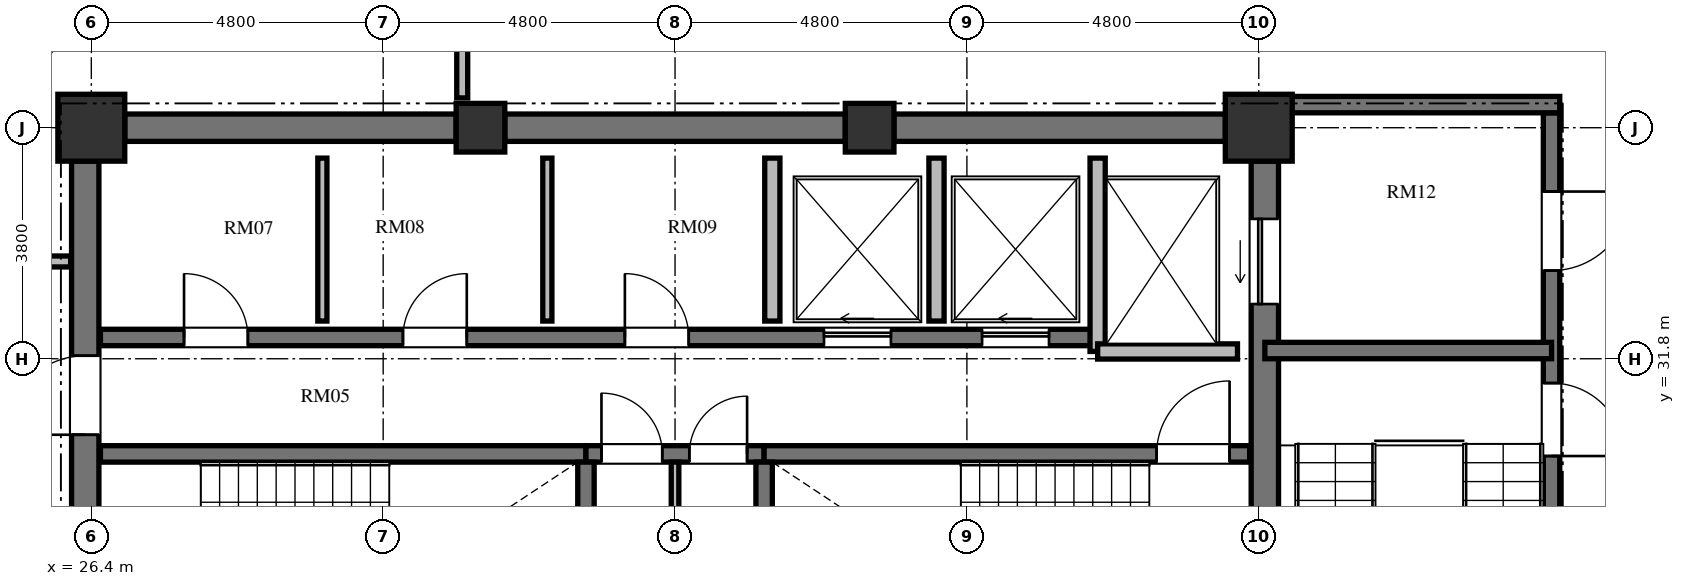
"""IFC4 building model, lengths in metres.
Left out: names, types, materials, properties, quantities, classifications, styles, units other than length and angle.
Written with IfcOpenShell. Run it as: python <this file> out.ifc"""

import sys

from ifc_helpers import new_model, si_unit, direction, frame, frame_2d, origin, origin_2d, place, context, subcontext, project, spatial, rectangle, extrude, element, fill, save


model = new_model("IFC4")
c1 = context("Model", 3, precision=1e-05, world=origin(), true_north=direction((0.0, 1.0)))
c2 = subcontext(c1, "Body", "Model", "MODEL_VIEW")
j1 = project(units=[si_unit("LENGTHUNIT", "METRE"), si_unit("PLANEANGLEUNIT", "RADIAN")], contexts=[c1])
p1 = place(None, origin())
s1 = spatial("IfcSite", under=j1, at=p1, CompositionType="ELEMENT")
p2 = place(p1, origin())
s2 = spatial("IfcBuilding", under=s1, at=p2, CompositionType="ELEMENT")
p3 = place(p2, frame((0.0, 0.0, 280.56)))
s3 = spatial("IfcBuildingStorey", under=s2, at=p3, CompositionType="ELEMENT", Elevation=280.56)
p4 = place(p3, frame((45.6, 35.6, 0.0), z_axis=(0.0, 0.0, 1.0), x_axis=(1.0, 0.0, 0.0)))
e1 = element("IfcColumn", 1, at=p4, inside=s3, PredefinedType="COLUMN", context=c2, shape_type="SweptSolid", body=[
    extrude(rectangle(XDim=1.1, YDim=1.1, at=origin_2d()), origin(), (0.0, 0.0, 1.0), 3.648),
])
for number, where, z_axis, x_axis in (
    (2, (39.2, 35.6, 0.0), (0.0, 0.0, 1.0), (1.0, 0.0, 0.0)),
    (3, (32.8, 35.6, 0.0), (0.0, 0.0, 1.0), (1.0, 0.0, 0.0)),
):
    element("IfcColumn", number, at=place(p3, frame(where, z_axis=z_axis, x_axis=x_axis)), inside=s3, PredefinedType="COLUMN", context=c2, shape_type="SweptSolid", body=[
        extrude(rectangle(XDim=0.8, YDim=0.8, at=origin_2d()), origin(), (0.0, 0.0, 1.0), 3.648),
    ])
p5 = place(p3, frame((26.4, 35.6, 0.0), z_axis=(0.0, 0.0, 1.0), x_axis=(1.0, 0.0, 0.0)))
e4 = element("IfcColumn", 4, at=p5, inside=s3, PredefinedType="COLUMN", context=c2, shape_type="SweptSolid", body=[
    extrude(rectangle(XDim=1.1, YDim=1.1, at=origin_2d()), origin(), (0.0, 0.0, 1.0), 3.648),
])
p6 = place(p3, frame((26.3, 20.95, 0.0), z_axis=(0.0, 0.0, 1.0), x_axis=(0.0, 1.0, 0.0)))
e5 = element("IfcWall", 5, at=p6, inside=s3, PredefinedType="SHEAR", context=c2, shape_type="SweptSolid", body=[
    extrude(rectangle(XDim=14.1, YDim=0.45, at=frame_2d((7.05, 0.0))), origin(), (0.0, 0.0, 1.0), 3.648),
])
p7 = place(p6, frame((6.5, 0.0, 0.0)))
e6 = element("IfcOpeningElement", 6, at=p7, cuts=e5, PredefinedType="OPENING", context=c2, shape_type="SweptSolid", body=[
    extrude(rectangle(XDim=1.2, YDim=2.15, at=frame_2d((0.6, 1.075))), frame((0.0, 0.235, 0.0), z_axis=(0.0, -1.0, 0.0), x_axis=(1.0, 0.0, 0.0)), (0.0, 0.0, 1.0), 0.47),
])
p8 = place(p6, frame((9.6, 0.0, 0.0)))
e7 = element("IfcOpeningElement", 7, at=p8, cuts=e5, PredefinedType="OPENING", context=c2, shape_type="SweptSolid", body=[
    extrude(rectangle(XDim=1.3, YDim=2.2, at=frame_2d((0.65, 1.1))), frame((0.0, 0.235, 0.0), z_axis=(0.0, -1.0, 0.0), x_axis=(1.0, 0.0, 0.0)), (0.0, 0.0, 1.0), 0.47),
])
p9 = place(p6, frame((3.26, 0.0, 0.0)))
e8 = element("IfcOpeningElement", 8, at=p9, cuts=e5, PredefinedType="OPENING", context=c2, shape_type="SweptSolid", body=[
    extrude(rectangle(XDim=1.3, YDim=2.2, at=frame_2d((0.65, 1.1))), frame((0.0, 0.235, 0.0), z_axis=(0.0, -1.0, 0.0), x_axis=(1.0, 0.0, 0.0)), (0.0, 0.0, 1.0), 0.47),
])
p10 = place(p3, frame((45.7, 20.95, 0.0), z_axis=(0.0, 0.0, 1.0), x_axis=(0.0, 1.0, 0.0)))
e9 = element("IfcWall", 9, at=p10, inside=s3, PredefinedType="SHEAR", context=c2, shape_type="SweptSolid", body=[
    extrude(rectangle(XDim=14.1, YDim=0.45, at=frame_2d((7.05, 0.0))), origin(), (0.0, 0.0, 1.0), 3.648),
])
p11 = place(p10, frame((11.75, 0.0, 0.0)))
e10 = element("IfcOpeningElement", 10, at=p11, cuts=e9, PredefinedType="OPENING", context=c2, shape_type="SweptSolid", body=[
    extrude(rectangle(XDim=1.4, YDim=2.3, at=frame_2d((0.7, 1.15))), frame((0.0, 0.235, 0.0), z_axis=(0.0, -1.0, 0.0), x_axis=(1.0, 0.0, 0.0)), (0.0, 0.0, 1.0), 0.47),
])
p12 = place(p10, frame((0.95, 0.0, 0.0)))
e11 = element("IfcOpeningElement", 11, at=p12, cuts=e9, PredefinedType="OPENING", context=c2, shape_type="SweptSolid", body=[
    extrude(rectangle(XDim=1.4, YDim=2.3, at=frame_2d((0.7, 1.15))), frame((0.0, 0.235, 0.0), z_axis=(0.0, -1.0, 0.0), x_axis=(1.0, 0.0, 0.0)), (0.0, 0.0, 1.0), 0.47),
])
p13 = place(p3, frame((26.95, 35.6, 0.0), z_axis=(0.0, 0.0, 1.0), x_axis=(1.0, 0.0, 0.0)))
e12 = element("IfcWall", 12, at=p13, inside=s3, PredefinedType="SHEAR", context=c2, shape_type="SweptSolid", body=[
    extrude(rectangle(XDim=5.45, YDim=0.45, at=frame_2d((2.725, 0.0))), origin(), (0.0, 0.0, 1.0), 3.648),
])
p14 = place(p3, frame((33.2, 35.6, 0.0), z_axis=(0.0, 0.0, 1.0), x_axis=(1.0, 0.0, 0.0)))
e13 = element("IfcWall", 13, at=p14, inside=s3, PredefinedType="SHEAR", context=c2, shape_type="SweptSolid", body=[
    extrude(rectangle(XDim=5.6, YDim=0.45, at=frame_2d((2.8, 0.0))), origin(), (0.0, 0.0, 1.0), 3.648),
])
p15 = place(p3, frame((39.6, 35.6, 0.0), z_axis=(0.0, 0.0, 1.0), x_axis=(1.0, 0.0, 0.0)))
e14 = element("IfcWall", 14, at=p15, inside=s3, PredefinedType="SHEAR", context=c2, shape_type="SweptSolid", body=[
    extrude(rectangle(XDim=5.45, YDim=0.45, at=frame_2d((2.725, 0.0))), origin(), (0.0, 0.0, 1.0), 3.648),
])
p16 = place(p3, frame((27.595, 38.808, 0.0), z_axis=(0.0, 0.0, 1.0), x_axis=(-0.728251519923, -0.685309947199, 0.0)))
e15 = element("IfcWall", 15, at=p16, inside=s3, PredefinedType="SOLIDWALL", context=c2, shape_type="SweptSolid", body=[
    extrude(rectangle(XDim=5.981, YDim=0.28, at=frame_2d((2.99, 0.0))), origin(), (0.0, 0.0, 1.0), 3.448),
])
p17 = place(p16, frame((2.391, 0.0, 0.85)))
e16 = element("IfcOpeningElement", 16, at=p17, cuts=e15, PredefinedType="OPENING", context=c2, shape_type="SweptSolid", body=[
    extrude(rectangle(XDim=1.2, YDim=1.8, at=frame_2d((0.6, 0.9))), frame((0.0, 0.15, 0.0), z_axis=(0.0, -1.0, 0.0), x_axis=(1.0, 0.0, 0.0)), (0.0, 0.0, 1.0), 0.3),
])
p18 = place(p3, frame((26.55, 30.235, 0.0), z_axis=(0.0, 0.0, 1.0), x_axis=(1.0, 0.0, 0.0)))
e17 = element("IfcWall", 17, at=p18, inside=s3, PredefinedType="SHEAR", context=c2, shape_type="SweptSolid", body=[
    extrude(rectangle(XDim=7.985, YDim=0.27, at=frame_2d((3.992, 0.0))), origin(), (0.0, 0.0, 1.0), 3.648),
])
p19 = place(p3, frame((34.535, 30.235, 0.0), z_axis=(0.0, 0.0, 1.0), x_axis=(1.0, 0.0, 0.0)))
e18 = element("IfcWall", 18, at=p19, inside=s3, PredefinedType="SHEAR", context=c2, shape_type="SweptSolid", body=[
    extrude(rectangle(XDim=2.93, YDim=0.27, at=frame_2d((1.465, 0.0))), origin(), (0.0, 0.0, 1.0), 3.648),
])
p20 = place(p19, frame((0.255, 0.0, 0.0)))
e19 = element("IfcOpeningElement", 19, at=p20, cuts=e18, PredefinedType="OPENING", context=c2, shape_type="SweptSolid", body=[
    extrude(rectangle(XDim=1.0, YDim=2.1, at=frame_2d((0.5, 1.05))), frame((0.0, 0.145, 0.0), z_axis=(0.0, -1.0, 0.0), x_axis=(1.0, 0.0, 0.0)), (0.0, 0.0, 1.0), 0.29),
])
p21 = place(p19, frame((1.7, 0.0, 0.0)))
e20 = element("IfcOpeningElement", 20, at=p21, cuts=e18, PredefinedType="OPENING", context=c2, shape_type="SweptSolid", body=[
    extrude(rectangle(XDim=0.95, YDim=2.1, at=frame_2d((0.475, 1.05))), frame((0.0, 0.145, 0.0), z_axis=(0.0, -1.0, 0.0), x_axis=(1.0, 0.0, 0.0)), (0.0, 0.0, 1.0), 0.29),
])
p22 = place(p3, frame((37.465, 30.235, 0.0), z_axis=(0.0, 0.0, 1.0), x_axis=(1.0, 0.0, 0.0)))
e21 = element("IfcWall", 21, at=p22, inside=s3, PredefinedType="SHEAR", context=c2, shape_type="SweptSolid", body=[
    extrude(rectangle(XDim=7.985, YDim=0.27, at=frame_2d((3.992, 0.0))), origin(), (0.0, 0.0, 1.0), 3.648),
])
p23 = place(p22, frame((6.455, 0.0, 0.0)))
e22 = element("IfcOpeningElement", 22, at=p23, cuts=e21, PredefinedType="OPENING", context=c2, shape_type="SweptSolid", body=[
    extrude(rectangle(XDim=1.2, YDim=2.15, at=frame_2d((0.6, 1.075))), frame((0.0, 0.145, 0.0), z_axis=(0.0, -1.0, 0.0), x_axis=(1.0, 0.0, 0.0)), (0.0, 0.0, 1.0), 0.29),
])
for number, where, z_axis, x_axis in (
    (23, (34.535, 26.02, 0.0), (0.0, 0.0, 1.0), (0.0, 1.0, 0.0)),
    (24, (37.465, 26.02, 0.0), (0.0, 0.0, 1.0), (0.0, 1.0, 0.0)),
):
    element("IfcWall", number, at=place(p3, frame(where, z_axis=z_axis, x_axis=x_axis)), inside=s3, PredefinedType="SHEAR", context=c2, shape_type="SweptSolid", body=[
        extrude(rectangle(XDim=4.08, YDim=0.27, at=frame_2d((2.04, 0.0))), origin(), (0.0, 0.0, 1.0), 3.648),
    ])
p24 = place(p3, frame((36.0, 26.02, 0.0), z_axis=(0.0, 0.0, 1.0), x_axis=(0.0, 1.0, 0.0)))
e25 = element("IfcWall", 25, at=p24, inside=s3, PredefinedType="PARTITIONING", context=c2, shape_type="SweptSolid", body=[
    extrude(rectangle(XDim=4.08, YDim=0.125, at=frame_2d((2.04, 0.0))), origin(), (0.0, 0.0, 1.0), 3.448),
])
p25 = place(p3, frame((26.55, 32.15, 0.0), z_axis=(0.0, 0.0, 1.0), x_axis=(1.0, 0.0, 0.0)))
e26 = element("IfcWall", 26, at=p25, inside=s3, PredefinedType="SHEAR", context=c2, shape_type="SweptSolid", body=[
    extrude(rectangle(XDim=16.4, YDim=0.27, at=frame_2d((8.2, 0.0))), origin(), (0.0, 0.0, 1.0), 3.648),
])
p26 = place(p25, frame((1.375, 0.0, 0.0)))
e27 = element("IfcOpeningElement", 27, at=p26, cuts=e26, PredefinedType="OPENING", context=c2, shape_type="SweptSolid", body=[
    extrude(rectangle(XDim=1.05, YDim=2.15, at=frame_2d((0.525, 1.075))), frame((0.0, 0.145, 0.0), z_axis=(0.0, -1.0, 0.0), x_axis=(1.0, 0.0, 0.0)), (0.0, 0.0, 1.0), 0.29),
])
p27 = place(p25, frame((4.975, 0.0, 0.0)))
e28 = element("IfcOpeningElement", 28, at=p27, cuts=e26, PredefinedType="OPENING", context=c2, shape_type="SweptSolid", body=[
    extrude(rectangle(XDim=1.05, YDim=2.15, at=frame_2d((0.525, 1.075))), frame((0.0, 0.145, 0.0), z_axis=(0.0, -1.0, 0.0), x_axis=(1.0, 0.0, 0.0)), (0.0, 0.0, 1.0), 0.29),
])
p28 = place(p25, frame((8.625, 0.0, 0.0)))
e29 = element("IfcOpeningElement", 29, at=p28, cuts=e26, PredefinedType="OPENING", context=c2, shape_type="SweptSolid", body=[
    extrude(rectangle(XDim=1.05, YDim=2.15, at=frame_2d((0.525, 1.075))), frame((0.0, 0.145, 0.0), z_axis=(0.0, -1.0, 0.0), x_axis=(1.0, 0.0, 0.0)), (0.0, 0.0, 1.0), 0.29),
])
p29 = place(p25, frame((11.9, 0.0, 0.0)))
e30 = element("IfcOpeningElement", 30, at=p29, cuts=e26, PredefinedType="OPENING", context=c2, shape_type="SweptSolid", body=[
    extrude(rectangle(XDim=1.1, YDim=2.2, at=frame_2d((0.55, 1.1))), frame((0.0, 0.145, 0.0), z_axis=(0.0, -1.0, 0.0), x_axis=(1.0, 0.0, 0.0)), (0.0, 0.0, 1.0), 0.29),
])
p30 = place(p25, frame((14.5, 0.0, 0.0)))
e31 = element("IfcOpeningElement", 31, at=p30, cuts=e26, PredefinedType="OPENING", context=c2, shape_type="SweptSolid", body=[
    extrude(rectangle(XDim=1.1, YDim=2.2, at=frame_2d((0.55, 1.1))), frame((0.0, 0.145, 0.0), z_axis=(0.0, -1.0, 0.0), x_axis=(1.0, 0.0, 0.0)), (0.0, 0.0, 1.0), 0.29),
])
p31 = place(p3, frame((42.95, 31.92, 0.0), z_axis=(0.0, 0.0, 1.0), x_axis=(0.0, 1.0, 0.0)))
e32 = element("IfcWall", 32, at=p31, inside=s3, PredefinedType="SOLIDWALL", context=c2, shape_type="SweptSolid", body=[
    extrude(rectangle(XDim=3.18, YDim=0.25, at=frame_2d((1.59, 0.0))), origin(), (0.0, 0.0, 1.0), 3.448),
])
p32 = place(p3, frame((42.95, 31.92, 0.0), z_axis=(0.0, 0.0, 1.0), x_axis=(1.0, 0.0, 0.0)))
e33 = element("IfcWall", 33, at=p32, inside=s3, PredefinedType="SOLIDWALL", context=c2, shape_type="SweptSolid", body=[
    extrude(rectangle(XDim=2.3, YDim=0.25, at=frame_2d((1.15, 0.0))), origin(), (0.0, 0.0, 1.0), 3.448),
])
for number, where, z_axis, x_axis in (
    (34, (37.6, 32.42, 0.0), (0.0, 0.0, 1.0), (0.0, 1.0, 0.0)),
    (35, (40.3, 32.42, 0.0), (0.0, 0.0, 1.0), (0.0, 1.0, 0.0)),
):
    element("IfcWall", number, at=place(p3, frame(where, z_axis=z_axis, x_axis=x_axis)), inside=s3, PredefinedType="SOLIDWALL", context=c2, shape_type="SweptSolid", body=[
        extrude(rectangle(XDim=2.68, YDim=0.25, at=frame_2d((1.34, 0.0))), origin(), (0.0, 0.0, 1.0), 3.448),
    ])
for number, where, z_axis, x_axis in (
    (36, (30.2, 32.42, 0.0), (0.0, 0.0, 1.0), (0.0, 1.0, 0.0)),
    (37, (33.9, 32.42, 0.0), (0.0, 0.0, 1.0), (0.0, 1.0, 0.0)),
):
    element("IfcWall", number, at=place(p3, frame(where, z_axis=z_axis, x_axis=x_axis)), inside=s3, PredefinedType="PARTITIONING", context=c2, shape_type="SweptSolid", body=[
        extrude(rectangle(XDim=2.68, YDim=0.15, at=frame_2d((1.34, 0.0))), origin(), (0.0, 0.0, 1.0), 3.448),
    ])
p33 = place(p3, frame((50.415, 35.845, 0.0), z_axis=(0.0, 0.0, 1.0), x_axis=(0.0, -1.0, 0.0)))
e38 = element("IfcWall", 38, at=p33, inside=s3, PredefinedType="SHEAR", context=c2, shape_type="SweptSolid", body=[
    extrude(rectangle(XDim=15.825, YDim=0.27, at=frame_2d((7.913, 0.0))), origin(), (0.0, 0.0, 1.0), 3.648),
])
p34 = place(p33, frame((4.445, 0.0, 0.0)))
e39 = element("IfcOpeningElement", 39, at=p34, cuts=e38, PredefinedType="OPENING", context=c2, shape_type="SweptSolid", body=[
    extrude(rectangle(XDim=1.2, YDim=2.15, at=frame_2d((0.6, 1.075))), frame((0.0, 0.145, 0.0), z_axis=(0.0, -1.0, 0.0), x_axis=(1.0, 0.0, 0.0)), (0.0, 0.0, 1.0), 0.29),
])
p35 = place(p33, frame((1.295, 0.0, 0.0)))
e40 = element("IfcOpeningElement", 40, at=p35, cuts=e38, PredefinedType="OPENING", context=c2, shape_type="SweptSolid", body=[
    extrude(rectangle(XDim=1.3, YDim=2.2, at=frame_2d((0.65, 1.1))), frame((0.0, 0.145, 0.0), z_axis=(0.0, -1.0, 0.0), x_axis=(1.0, 0.0, 0.0)), (0.0, 0.0, 1.0), 0.29),
])
p36 = place(p33, frame((13.095, 0.0, 0.0)))
e41 = element("IfcOpeningElement", 41, at=p36, cuts=e38, PredefinedType="OPENING", context=c2, shape_type="SweptSolid", body=[
    extrude(rectangle(XDim=1.3, YDim=2.2, at=frame_2d((0.65, 1.1))), frame((0.0, 0.145, 0.0), z_axis=(0.0, -1.0, 0.0), x_axis=(1.0, 0.0, 0.0)), (0.0, 0.0, 1.0), 0.29),
])
p37 = place(p3, frame((45.925, 35.98, 0.0), z_axis=(0.0, 0.0, 1.0), x_axis=(1.0, 0.0, 0.0)))
e42 = element("IfcWall", 42, at=p37, inside=s3, PredefinedType="SHEAR", context=c2, shape_type="SweptSolid", body=[
    extrude(rectangle(XDim=4.625, YDim=0.27, at=frame_2d((2.312, 0.0))), origin(), (0.0, 0.0, 1.0), 3.648),
])
p38 = place(p3, frame((45.7, 31.935, 0.0), z_axis=(0.0, 0.0, 1.0), x_axis=(1.0, 0.0, 0.0)))
e43 = element("IfcWall", 43, at=p38, inside=s3, PredefinedType="SHEAR", context=c2, shape_type="SweptSolid", body=[
    extrude(rectangle(XDim=4.715, YDim=0.27, at=frame_2d((2.357, 0.0))), origin(), (0.0, 0.0, 1.0), 3.648),
])
p39 = place(p3, frame((32.5, 36.09, 0.0), z_axis=(0.0, 0.0, 1.0), x_axis=(0.0, 1.0, 0.0)))
e44 = element("IfcWall", 44, at=p39, inside=s3, PredefinedType="PARTITIONING", context=c2, shape_type="SweptSolid", body=[
    extrude(rectangle(XDim=2.35, YDim=0.18, at=frame_2d((1.175, 0.0))), origin(), (0.0, 0.0, 1.0), 3.448),
])
p40 = place(p3, frame((23.71, 33.4, 0.0), z_axis=(0.0, 0.0, 1.0), x_axis=(1.0, 0.0, 0.0)))
e45 = element("IfcWall", 45, at=p40, inside=s3, PredefinedType="PARTITIONING", context=c2, shape_type="SweptSolid", body=[
    extrude(rectangle(XDim=2.35, YDim=0.18, at=frame_2d((1.175, 0.0))), origin(), (0.0, 0.0, 1.0), 3.448),
])
p41 = place(p17, origin())
e46 = element("IfcWindow", 46, at=p41, inside=s3, PartitioningType="SINGLE_PANEL", PredefinedType="WINDOW", context=c2, shape_type="SweptSolid", body=[
    extrude(rectangle(XDim=1.2, YDim=1.8, at=frame_2d((0.6, 0.9))), frame((0.0, 0.03, 0.0), z_axis=(0.0, -1.0, 0.0), x_axis=(1.0, 0.0, 0.0)), (0.0, 0.0, 1.0), 0.06),
])
fill(e16, e46)
p42 = place(p23, origin())
e47 = element("IfcDoor", 47, at=p42, inside=s3, OperationType="SINGLE_SWING_RIGHT", PredefinedType="DOOR", context=c2, shape_type="SweptSolid", body=[
    extrude(rectangle(XDim=1.2, YDim=2.15, at=frame_2d((0.6, 1.075))), frame((0.0, 0.025, 0.0), z_axis=(0.0, -1.0, 0.0), x_axis=(1.0, 0.0, 0.0)), (0.0, 0.0, 1.0), 0.05),
])
fill(e22, e47)
p43 = place(p20, origin())
e48 = element("IfcDoor", 48, at=p43, inside=s3, OperationType="SINGLE_SWING_LEFT", PredefinedType="DOOR", context=c2, shape_type="SweptSolid", body=[
    extrude(rectangle(XDim=1.0, YDim=2.1, at=frame_2d((0.5, 1.05))), frame((0.0, 0.025, 0.0), z_axis=(0.0, -1.0, 0.0), x_axis=(1.0, 0.0, 0.0)), (0.0, 0.0, 1.0), 0.05),
])
fill(e19, e48)
p44 = place(p21, origin())
e49 = element("IfcDoor", 49, at=p44, inside=s3, OperationType="SINGLE_SWING_RIGHT", PredefinedType="DOOR", context=c2, shape_type="SweptSolid", body=[
    extrude(rectangle(XDim=0.95, YDim=2.1, at=frame_2d((0.475, 1.05))), frame((0.0, 0.025, 0.0), z_axis=(0.0, -1.0, 0.0), x_axis=(1.0, 0.0, 0.0)), (0.0, 0.0, 1.0), 0.05),
])
fill(e20, e49)
p45 = place(p8, origin())
e50 = element("IfcDoor", 50, at=p45, inside=s3, OperationType="SINGLE_SWING_LEFT", PredefinedType="DOOR", context=c2, shape_type="SweptSolid", body=[
    extrude(rectangle(XDim=1.3, YDim=2.2, at=frame_2d((0.65, 1.1))), frame((0.0, 0.025, 0.0), z_axis=(0.0, -1.0, 0.0), x_axis=(1.0, 0.0, 0.0)), (0.0, 0.0, 1.0), 0.05),
])
fill(e7, e50)
p46 = place(p26, origin())
e51 = element("IfcDoor", 51, at=p46, inside=s3, OperationType="SINGLE_SWING_LEFT", PredefinedType="DOOR", context=c2, shape_type="SweptSolid", body=[
    extrude(rectangle(XDim=1.05, YDim=2.15, at=frame_2d((0.525, 1.075))), frame((0.0, 0.025, 0.0), z_axis=(0.0, -1.0, 0.0), x_axis=(1.0, 0.0, 0.0)), (0.0, 0.0, 1.0), 0.05),
])
fill(e27, e51)
p47 = place(p27, origin())
e52 = element("IfcDoor", 52, at=p47, inside=s3, OperationType="SINGLE_SWING_RIGHT", PredefinedType="DOOR", context=c2, shape_type="SweptSolid", body=[
    extrude(rectangle(XDim=1.05, YDim=2.15, at=frame_2d((0.525, 1.075))), frame((0.0, 0.025, 0.0), z_axis=(0.0, -1.0, 0.0), x_axis=(1.0, 0.0, 0.0)), (0.0, 0.0, 1.0), 0.05),
])
fill(e28, e52)
p48 = place(p28, origin())
e53 = element("IfcDoor", 53, at=p48, inside=s3, OperationType="SINGLE_SWING_LEFT", PredefinedType="DOOR", context=c2, shape_type="SweptSolid", body=[
    extrude(rectangle(XDim=1.05, YDim=2.15, at=frame_2d((0.525, 1.075))), frame((0.0, 0.025, 0.0), z_axis=(0.0, -1.0, 0.0), x_axis=(1.0, 0.0, 0.0)), (0.0, 0.0, 1.0), 0.05),
])
fill(e29, e53)
p49 = place(p29, origin())
e54 = element("IfcDoor", 54, at=p49, inside=s3, OperationType="SLIDING_TO_LEFT", PredefinedType="DOOR", context=c2, shape_type="SweptSolid", body=[
    extrude(rectangle(XDim=1.1, YDim=2.2, at=frame_2d((0.55, 1.1))), frame((0.0, 0.025, 0.0), z_axis=(0.0, -1.0, 0.0), x_axis=(1.0, 0.0, 0.0)), (0.0, 0.0, 1.0), 0.05),
])
fill(e30, e54)
p50 = place(p30, origin())
e55 = element("IfcDoor", 55, at=p50, inside=s3, OperationType="SLIDING_TO_LEFT", PredefinedType="DOOR", context=c2, shape_type="SweptSolid", body=[
    extrude(rectangle(XDim=1.1, YDim=2.2, at=frame_2d((0.55, 1.1))), frame((0.0, 0.025, 0.0), z_axis=(0.0, -1.0, 0.0), x_axis=(1.0, 0.0, 0.0)), (0.0, 0.0, 1.0), 0.05),
])
fill(e31, e55)
p51 = place(p11, origin())
e56 = element("IfcDoor", 56, at=p51, inside=s3, OperationType="SLIDING_TO_LEFT", PredefinedType="DOOR", context=c2, shape_type="SweptSolid", body=[
    extrude(rectangle(XDim=1.4, YDim=2.3, at=frame_2d((0.7, 1.15))), frame((0.0, 0.025, 0.0), z_axis=(0.0, -1.0, 0.0), x_axis=(1.0, 0.0, 0.0)), (0.0, 0.0, 1.0), 0.05),
])
fill(e10, e56)
p52 = place(p34, origin())
e57 = element("IfcDoor", 57, at=p52, inside=s3, OperationType="SINGLE_SWING_RIGHT", PredefinedType="DOOR", context=c2, shape_type="SweptSolid", body=[
    extrude(rectangle(XDim=1.2, YDim=2.15, at=frame_2d((0.6, 1.075))), frame((0.0, 0.025, 0.0), z_axis=(0.0, -1.0, 0.0), x_axis=(1.0, 0.0, 0.0)), (0.0, 0.0, 1.0), 0.05),
])
fill(e39, e57)
p53 = place(p35, origin())
e58 = element("IfcDoor", 58, at=p53, inside=s3, OperationType="SINGLE_SWING_LEFT", PredefinedType="DOOR", context=c2, shape_type="SweptSolid", body=[
    extrude(rectangle(XDim=1.3, YDim=2.2, at=frame_2d((0.65, 1.1))), frame((0.0, 0.025, 0.0), z_axis=(0.0, -1.0, 0.0), x_axis=(1.0, 0.0, 0.0)), (0.0, 0.0, 1.0), 0.05),
])
fill(e40, e58)
save(model, sys.argv[1])
